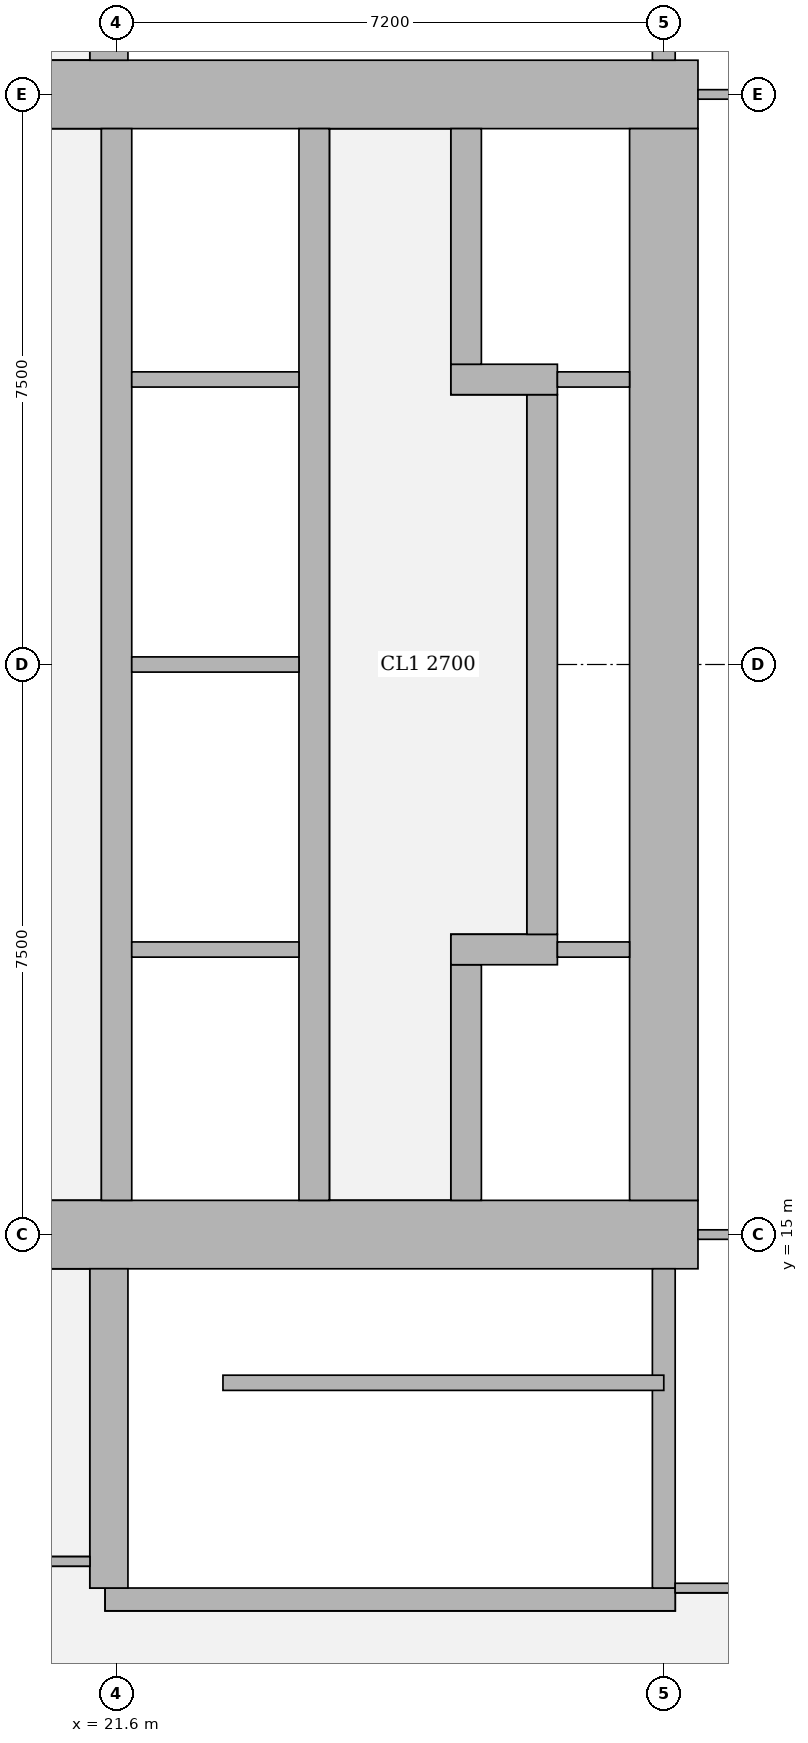
"""IFC4 building model, lengths in metres.
Left out: names, types, materials, properties, quantities, classifications, styles, units other than length and angle.
Written with IfcOpenShell. Run it as: python <this file> out.ifc"""

import sys

from ifc_helpers import new_model, si_unit, direction, frame, frame_2d, origin, place, context, subcontext, project, spatial, rectangle, extrude, element, fill, save


model = new_model("IFC4")
c1 = context("Model", 3, precision=1e-05, world=origin(), true_north=direction((0.0, 1.0)))
c2 = subcontext(c1, "Body", "Model", "MODEL_VIEW")
j1 = project(units=[si_unit("LENGTHUNIT", "METRE"), si_unit("PLANEANGLEUNIT", "RADIAN")], contexts=[c1])
p1 = place(None, origin())
s1 = spatial("IfcSite", under=j1, at=p1, CompositionType="ELEMENT")
p2 = place(p1, origin())
s2 = spatial("IfcBuilding", under=s1, at=p2, CompositionType="ELEMENT")
p3 = place(p2, frame((0.0, 0.0, 223.7)))
s3 = spatial("IfcBuildingStorey", under=s2, at=p3, CompositionType="ELEMENT", Elevation=223.7)
p4 = place(p3, frame((13.95, 15.0, 0.0), z_axis=(0.0, 0.0, 1.0), x_axis=(1.0, 0.0, 0.0)))
e1 = element("IfcWall", 1, at=p4, inside=s3, PredefinedType="SHEAR", context=c2, shape_type="SweptSolid", body=[
    extrude(rectangle(XDim=15.3, YDim=0.9, at=frame_2d((7.65, 0.0))), origin(), (0.0, 0.0, 1.0), 3.75),
])
p5 = place(p4, frame((4.45, 0.0, 0.0)))
e2 = element("IfcOpeningElement", 2, at=p5, cuts=e1, PredefinedType="OPENING", context=c2, shape_type="SweptSolid", body=[
    extrude(rectangle(XDim=1.8, YDim=2.1, at=frame_2d((0.9, 1.05))), frame((0.0, 0.46, 0.0), z_axis=(0.0, -1.0, 0.0), x_axis=(1.0, 0.0, 0.0)), (0.0, 0.0, 1.0), 0.92),
])
p6 = place(p4, frame((10.7, 0.0, 0.0)))
e3 = element("IfcOpeningElement", 3, at=p6, cuts=e1, PredefinedType="OPENING", context=c2, shape_type="SweptSolid", body=[
    extrude(rectangle(XDim=1.1, YDim=2.1, at=frame_2d((0.55, 1.05))), frame((0.0, 0.46, 0.0), z_axis=(0.0, -1.0, 0.0), x_axis=(1.0, 0.0, 0.0)), (0.0, 0.0, 1.0), 0.92),
])
p7 = place(p3, frame((13.95, 30.0, 0.0), z_axis=(0.0, 0.0, 1.0), x_axis=(1.0, 0.0, 0.0)))
e4 = element("IfcWall", 4, at=p7, inside=s3, PredefinedType="SHEAR", context=c2, shape_type="SweptSolid", body=[
    extrude(rectangle(XDim=15.3, YDim=0.9, at=frame_2d((7.65, 0.0))), origin(), (0.0, 0.0, 1.0), 3.75),
])
p8 = place(p7, frame((4.45, 0.0, 0.0)))
e5 = element("IfcOpeningElement", 5, at=p8, cuts=e4, PredefinedType="OPENING", context=c2, shape_type="SweptSolid", body=[
    extrude(rectangle(XDim=1.8, YDim=2.1, at=frame_2d((0.9, 1.05))), frame((0.0, 0.46, 0.0), z_axis=(0.0, -1.0, 0.0), x_axis=(1.0, 0.0, 0.0)), (0.0, 0.0, 1.0), 0.92),
])
p9 = place(p7, frame((10.7, 0.0, 0.0)))
e6 = element("IfcOpeningElement", 6, at=p9, cuts=e4, PredefinedType="OPENING", context=c2, shape_type="SweptSolid", body=[
    extrude(rectangle(XDim=1.1, YDim=2.1, at=frame_2d((0.55, 1.05))), frame((0.0, 0.46, 0.0), z_axis=(0.0, -1.0, 0.0), x_axis=(1.0, 0.0, 0.0)), (0.0, 0.0, 1.0), 0.92),
])
p10 = place(p3, frame((28.8, 15.45, 0.0), z_axis=(0.0, 0.0, 1.0), x_axis=(0.0, 1.0, 0.0)))
e7 = element("IfcWall", 7, at=p10, inside=s3, PredefinedType="SHEAR", context=c2, shape_type="SweptSolid", body=[
    extrude(rectangle(XDim=14.1, YDim=0.9, at=frame_2d((7.05, 0.0))), origin(), (0.0, 0.0, 1.0), 3.75),
])
p11 = place(p3, frame((21.6, 15.45, 0.0), z_axis=(0.0, 0.0, 1.0), x_axis=(0.0, 1.0, 0.0)))
e8 = element("IfcWall", 8, at=p11, inside=s3, PredefinedType="SHEAR", context=c2, shape_type="SweptSolid", body=[
    extrude(rectangle(XDim=14.1, YDim=0.4, at=frame_2d((7.05, 0.0))), origin(), (0.0, 0.0, 1.0), 3.75),
])
p12 = place(p11, frame((0.875, 0.0, 0.0)))
e9 = element("IfcOpeningElement", 9, at=p12, cuts=e8, PredefinedType="OPENING", context=c2, shape_type="SweptSolid", body=[
    extrude(rectangle(XDim=1.1, YDim=2.1, at=frame_2d((0.55, 1.05))), frame((0.0, 0.21, 0.0), z_axis=(0.0, -1.0, 0.0), x_axis=(1.0, 0.0, 0.0)), (0.0, 0.0, 1.0), 0.42),
])
p13 = place(p11, frame((4.625, 0.0, 0.0)))
e10 = element("IfcOpeningElement", 10, at=p13, cuts=e8, PredefinedType="OPENING", context=c2, shape_type="SweptSolid", body=[
    extrude(rectangle(XDim=1.1, YDim=2.1, at=frame_2d((0.55, 1.05))), frame((0.0, 0.21, 0.0), z_axis=(0.0, -1.0, 0.0), x_axis=(1.0, 0.0, 0.0)), (0.0, 0.0, 1.0), 0.42),
])
p14 = place(p11, frame((8.375, 0.0, 0.0)))
e11 = element("IfcOpeningElement", 11, at=p14, cuts=e8, PredefinedType="OPENING", context=c2, shape_type="SweptSolid", body=[
    extrude(rectangle(XDim=1.1, YDim=2.1, at=frame_2d((0.55, 1.05))), frame((0.0, 0.21, 0.0), z_axis=(0.0, -1.0, 0.0), x_axis=(1.0, 0.0, 0.0)), (0.0, 0.0, 1.0), 0.42),
])
p15 = place(p11, frame((12.125, 0.0, 0.0)))
e12 = element("IfcOpeningElement", 12, at=p15, cuts=e8, PredefinedType="OPENING", context=c2, shape_type="SweptSolid", body=[
    extrude(rectangle(XDim=1.1, YDim=2.1, at=frame_2d((0.55, 1.05))), frame((0.0, 0.21, 0.0), z_axis=(0.0, -1.0, 0.0), x_axis=(1.0, 0.0, 0.0)), (0.0, 0.0, 1.0), 0.42),
])
p16 = place(p3, frame((24.2, 15.45, 0.0), z_axis=(0.0, 0.0, 1.0), x_axis=(0.0, 1.0, 0.0)))
e13 = element("IfcWall", 13, at=p16, inside=s3, PredefinedType="SHEAR", context=c2, shape_type="SweptSolid", body=[
    extrude(rectangle(XDim=14.1, YDim=0.4, at=frame_2d((7.05, 0.0))), origin(), (0.0, 0.0, 1.0), 3.75),
])
p17 = place(p3, frame((26.2, 15.45, 0.0), z_axis=(0.0, 0.0, 1.0), x_axis=(0.0, 1.0, 0.0)))
e14 = element("IfcWall", 14, at=p17, inside=s3, PredefinedType="SHEAR", context=c2, shape_type="SweptSolid", body=[
    extrude(rectangle(XDim=3.1, YDim=0.4, at=frame_2d((1.55, 0.0))), origin(), (0.0, 0.0, 1.0), 3.75),
])
p18 = place(p17, frame((0.825, 0.0, 0.0)))
e15 = element("IfcOpeningElement", 15, at=p18, cuts=e14, PredefinedType="OPENING", context=c2, shape_type="SweptSolid", body=[
    extrude(rectangle(XDim=1.2, YDim=2.1, at=frame_2d((0.6, 1.05))), frame((0.0, 0.21, 0.0), z_axis=(0.0, -1.0, 0.0), x_axis=(1.0, 0.0, 0.0)), (0.0, 0.0, 1.0), 0.42),
])
p19 = place(p3, frame((26.0, 18.75, 0.0), z_axis=(0.0, 0.0, 1.0), x_axis=(1.0, 0.0, 0.0)))
e16 = element("IfcWall", 16, at=p19, inside=s3, PredefinedType="SHEAR", context=c2, shape_type="SweptSolid", body=[
    extrude(rectangle(XDim=1.4, YDim=0.4, at=frame_2d((0.7, 0.0))), origin(), (0.0, 0.0, 1.0), 3.75),
])
p20 = place(p3, frame((27.2, 18.95, 0.0), z_axis=(0.0, 0.0, 1.0), x_axis=(0.0, 1.0, 0.0)))
e17 = element("IfcWall", 17, at=p20, inside=s3, PredefinedType="SHEAR", context=c2, shape_type="SweptSolid", body=[
    extrude(rectangle(XDim=7.1, YDim=0.4, at=frame_2d((3.55, 0.0))), origin(), (0.0, 0.0, 1.0), 3.75),
])
p21 = place(p3, frame((26.0, 26.25, 0.0), z_axis=(0.0, 0.0, 1.0), x_axis=(1.0, 0.0, 0.0)))
e18 = element("IfcWall", 18, at=p21, inside=s3, PredefinedType="SHEAR", context=c2, shape_type="SweptSolid", body=[
    extrude(rectangle(XDim=1.4, YDim=0.4, at=frame_2d((0.7, 0.0))), origin(), (0.0, 0.0, 1.0), 3.75),
])
p22 = place(p3, frame((26.2, 26.45, 0.0), z_axis=(0.0, 0.0, 1.0), x_axis=(0.0, 1.0, 0.0)))
e19 = element("IfcWall", 19, at=p22, inside=s3, PredefinedType="SHEAR", context=c2, shape_type="SweptSolid", body=[
    extrude(rectangle(XDim=3.1, YDim=0.4, at=frame_2d((1.55, 0.0))), origin(), (0.0, 0.0, 1.0), 3.75),
])
p23 = place(p22, frame((1.075, 0.0, 0.0)))
e20 = element("IfcOpeningElement", 20, at=p23, cuts=e19, PredefinedType="OPENING", context=c2, shape_type="SweptSolid", body=[
    extrude(rectangle(XDim=1.2, YDim=2.1, at=frame_2d((0.6, 1.05))), frame((0.0, 0.21, 0.0), z_axis=(0.0, -1.0, 0.0), x_axis=(1.0, 0.0, 0.0)), (0.0, 0.0, 1.0), 0.42),
])
p24 = place(p3, frame((21.45, 10.2, 0.0), z_axis=(0.0, 0.0, 1.0), x_axis=(1.0, 0.0, 0.0)))
e21 = element("IfcWall", 21, at=p24, inside=s3, PredefinedType="SHEAR", context=c2, shape_type="SweptSolid", body=[
    extrude(rectangle(XDim=7.5, YDim=0.3, at=frame_2d((3.75, 0.0))), origin(), (0.0, 0.0, 1.0), 3.75),
])
p25 = place(p24, frame((0.5, 0.0, 0.0)))
e22 = element("IfcOpeningElement", 22, at=p25, cuts=e21, PredefinedType="OPENING", context=c2, shape_type="SweptSolid", body=[
    extrude(rectangle(XDim=1.1, YDim=2.1, at=frame_2d((0.55, 1.05))), frame((0.0, 0.16, 0.0), z_axis=(0.0, -1.0, 0.0), x_axis=(1.0, 0.0, 0.0)), (0.0, 0.0, 1.0), 0.32),
])
p26 = place(p3, frame((21.5, 10.35, 0.0), z_axis=(0.0, 0.0, 1.0), x_axis=(0.0, 1.0, 0.0)))
e23 = element("IfcWall", 23, at=p26, inside=s3, PredefinedType="SHEAR", context=c2, shape_type="SweptSolid", body=[
    extrude(rectangle(XDim=4.2, YDim=0.5, at=frame_2d((2.1, 0.0))), origin(), (0.0, 0.0, 1.0), 3.75),
])
p27 = place(p3, frame((28.8, 10.35, 0.0), z_axis=(0.0, 0.0, 1.0), x_axis=(0.0, 1.0, 0.0)))
e24 = element("IfcWall", 24, at=p27, inside=s3, PredefinedType="SHEAR", context=c2, shape_type="SweptSolid", body=[
    extrude(rectangle(XDim=4.2, YDim=0.3, at=frame_2d((2.1, 0.0))), origin(), (0.0, 0.0, 1.0), 3.75),
])
p28 = place(p3, frame((21.5, 30.45, 0.0), z_axis=(0.0, 0.0, 1.0), x_axis=(0.0, 1.0, 0.0)))
e25 = element("IfcWall", 25, at=p28, inside=s3, PredefinedType="SHEAR", context=c2, shape_type="SweptSolid", body=[
    extrude(rectangle(XDim=4.2, YDim=0.5, at=frame_2d((2.1, 0.0))), origin(), (0.0, 0.0, 1.0), 3.75),
])
p29 = place(p3, frame((28.8, 30.45, 0.0), z_axis=(0.0, 0.0, 1.0), x_axis=(0.0, 1.0, 0.0)))
e26 = element("IfcWall", 26, at=p29, inside=s3, PredefinedType="SHEAR", context=c2, shape_type="SweptSolid", body=[
    extrude(rectangle(XDim=4.2, YDim=0.3, at=frame_2d((2.1, 0.0))), origin(), (0.0, 0.0, 1.0), 3.75),
])
p30 = place(p3, frame((13.75, 10.7, 0.0), z_axis=(0.0, 0.0, 1.0), x_axis=(1.0, 0.0, 0.0)))
e27 = element("IfcWall", 27, at=p30, inside=s3, PredefinedType="PARTITIONING", context=c2, shape_type="SweptSolid", body=[
    extrude(rectangle(XDim=7.5, YDim=0.125, at=frame_2d((3.75, 0.0))), origin(), (0.0, 0.0, 1.0), 3.5),
])
p31 = place(p30, frame((4.245, 0.0, 0.0)))
e28 = element("IfcOpeningElement", 28, at=p31, cuts=e27, PredefinedType="OPENING", context=c2, shape_type="SweptSolid", body=[
    extrude(rectangle(XDim=1.8, YDim=2.1, at=frame_2d((0.9, 1.05))), frame((0.0, 0.073, 0.0), z_axis=(0.0, -1.0, 0.0), x_axis=(1.0, 0.0, 0.0)), (0.0, 0.0, 1.0), 0.145),
])
p32 = place(p3, frame((28.95, 10.35, 0.0), z_axis=(0.0, 0.0, 1.0), x_axis=(1.0, 0.0, 0.0)))
e29 = element("IfcWall", 29, at=p32, inside=s3, PredefinedType="PARTITIONING", context=c2, shape_type="SweptSolid", body=[
    extrude(rectangle(XDim=8.886, YDim=0.125, at=frame_2d((4.443, 0.0))), origin(), (0.0, 0.0, 1.0), 3.5),
])
p33 = place(p3, frame((29.25, 15.0, 0.0), z_axis=(0.0, 0.0, 1.0), x_axis=(1.0, 0.0, 0.0)))
e30 = element("IfcWall", 30, at=p33, inside=s3, PredefinedType="PARTITIONING", context=c2, shape_type="SweptSolid", body=[
    extrude(rectangle(XDim=6.049, YDim=0.125, at=frame_2d((3.024, 0.0))), origin(), (0.0, 0.0, 1.0), 3.5),
])
p34 = place(p3, frame((29.25, 30.0, 0.0), z_axis=(0.0, 0.0, 1.0), x_axis=(1.0, 0.0, 0.0)))
e31 = element("IfcWall", 31, at=p34, inside=s3, PredefinedType="PARTITIONING", context=c2, shape_type="SweptSolid", body=[
    extrude(rectangle(XDim=3.049, YDim=0.125, at=frame_2d((1.524, 0.0))), origin(), (0.0, 0.0, 1.0), 3.5),
])
p35 = place(p3, frame((23.0, 13.05, 0.0), z_axis=(0.0, 0.0, 1.0), x_axis=(1.0, 0.0, 0.0)))
e32 = element("IfcWall", 32, at=p35, inside=s3, PredefinedType="SHEAR", context=c2, shape_type="SweptSolid", body=[
    extrude(rectangle(XDim=5.8, YDim=0.2, at=frame_2d((2.9, 0.0))), origin(), (0.0, 0.0, 1.0), 3.75),
])
for number, where, z_axis, x_axis in (
    (33, (21.8, 18.75, 0.0), (0.0, 0.0, 1.0), (1.0, 0.0, 0.0)),
    (34, (21.8, 22.5, 0.0), (0.0, 0.0, 1.0), (1.0, 0.0, 0.0)),
    (35, (21.8, 26.25, 0.0), (0.0, 0.0, 1.0), (1.0, 0.0, 0.0)),
):
    element("IfcWall", number, at=place(p3, frame(where, z_axis=z_axis, x_axis=x_axis)), inside=s3, PredefinedType="SOLIDWALL", context=c2, shape_type="SweptSolid", body=[
        extrude(rectangle(XDim=2.2, YDim=0.2, at=frame_2d((1.1, 0.0))), origin(), (0.0, 0.0, 1.0), 3.5),
    ])
for number, where, z_axis, x_axis in (
    (36, (27.4, 18.75, 0.0), (0.0, 0.0, 1.0), (1.0, 0.0, 0.0)),
    (37, (27.4, 26.25, 0.0), (0.0, 0.0, 1.0), (1.0, 0.0, 0.0)),
):
    element("IfcWall", number, at=place(p3, frame(where, z_axis=z_axis, x_axis=x_axis)), inside=s3, PredefinedType="SOLIDWALL", context=c2, shape_type="SweptSolid", body=[
        extrude(rectangle(XDim=0.95, YDim=0.2, at=frame_2d((0.475, 0.0))), origin(), (0.0, 0.0, 1.0), 3.5),
    ])
p36 = place(p6, origin())
e38 = element("IfcDoor", 38, at=p36, inside=s3, OperationType="SINGLE_SWING_LEFT", PredefinedType="DOOR", context=c2, shape_type="SweptSolid", body=[
    extrude(rectangle(XDim=1.1, YDim=2.1, at=frame_2d((0.55, 1.05))), frame((0.0, 0.025, 0.0), z_axis=(0.0, -1.0, 0.0), x_axis=(1.0, 0.0, 0.0)), (0.0, 0.0, 1.0), 0.05),
])
fill(e3, e38)
p37 = place(p9, origin())
e39 = element("IfcDoor", 39, at=p37, inside=s3, OperationType="SINGLE_SWING_LEFT", PredefinedType="DOOR", context=c2, shape_type="SweptSolid", body=[
    extrude(rectangle(XDim=1.1, YDim=2.1, at=frame_2d((0.55, 1.05))), frame((0.0, 0.025, 0.0), z_axis=(0.0, -1.0, 0.0), x_axis=(1.0, 0.0, 0.0)), (0.0, 0.0, 1.0), 0.05),
])
fill(e6, e39)
p38 = place(p18, origin())
e40 = element("IfcDoor", 40, at=p38, inside=s3, OperationType="DOUBLE_DOOR_SLIDING", PredefinedType="DOOR", context=c2, shape_type="SweptSolid", body=[
    extrude(rectangle(XDim=1.2, YDim=2.1, at=frame_2d((0.6, 1.05))), frame((0.0, 0.025, 0.0), z_axis=(0.0, -1.0, 0.0), x_axis=(1.0, 0.0, 0.0)), (0.0, 0.0, 1.0), 0.05),
])
fill(e15, e40)
p39 = place(p23, origin())
e41 = element("IfcDoor", 41, at=p39, inside=s3, OperationType="DOUBLE_DOOR_SLIDING", PredefinedType="DOOR", context=c2, shape_type="SweptSolid", body=[
    extrude(rectangle(XDim=1.2, YDim=2.1, at=frame_2d((0.6, 1.05))), frame((0.0, 0.025, 0.0), z_axis=(0.0, -1.0, 0.0), x_axis=(1.0, 0.0, 0.0)), (0.0, 0.0, 1.0), 0.05),
])
fill(e20, e41)
p40 = place(p12, origin())
e42 = element("IfcDoor", 42, at=p40, inside=s3, OperationType="DOUBLE_DOOR_SLIDING", PredefinedType="DOOR", context=c2, shape_type="SweptSolid", body=[
    extrude(rectangle(XDim=1.1, YDim=2.1, at=frame_2d((0.55, 1.05))), frame((0.0, 0.025, 0.0), z_axis=(0.0, -1.0, 0.0), x_axis=(1.0, 0.0, 0.0)), (0.0, 0.0, 1.0), 0.05),
])
fill(e9, e42)
p41 = place(p13, origin())
e43 = element("IfcDoor", 43, at=p41, inside=s3, OperationType="DOUBLE_DOOR_SLIDING", PredefinedType="DOOR", context=c2, shape_type="SweptSolid", body=[
    extrude(rectangle(XDim=1.1, YDim=2.1, at=frame_2d((0.55, 1.05))), frame((0.0, 0.025, 0.0), z_axis=(0.0, -1.0, 0.0), x_axis=(1.0, 0.0, 0.0)), (0.0, 0.0, 1.0), 0.05),
])
fill(e10, e43)
p42 = place(p14, origin())
e44 = element("IfcDoor", 44, at=p42, inside=s3, OperationType="DOUBLE_DOOR_SLIDING", PredefinedType="DOOR", context=c2, shape_type="SweptSolid", body=[
    extrude(rectangle(XDim=1.1, YDim=2.1, at=frame_2d((0.55, 1.05))), frame((0.0, 0.025, 0.0), z_axis=(0.0, -1.0, 0.0), x_axis=(1.0, 0.0, 0.0)), (0.0, 0.0, 1.0), 0.05),
])
fill(e11, e44)
p43 = place(p15, origin())
e45 = element("IfcDoor", 45, at=p43, inside=s3, OperationType="DOUBLE_DOOR_SLIDING", PredefinedType="DOOR", context=c2, shape_type="SweptSolid", body=[
    extrude(rectangle(XDim=1.1, YDim=2.1, at=frame_2d((0.55, 1.05))), frame((0.0, 0.025, 0.0), z_axis=(0.0, -1.0, 0.0), x_axis=(1.0, 0.0, 0.0)), (0.0, 0.0, 1.0), 0.05),
])
fill(e12, e45)
p44 = place(p25, origin())
e46 = element("IfcDoor", 46, at=p44, inside=s3, OperationType="SINGLE_SWING_LEFT", PredefinedType="DOOR", context=c2, shape_type="SweptSolid", body=[
    extrude(rectangle(XDim=1.1, YDim=2.1, at=frame_2d((0.55, 1.05))), frame((0.0, 0.025, 0.0), z_axis=(0.0, -1.0, 0.0), x_axis=(1.0, 0.0, 0.0)), (0.0, 0.0, 1.0), 0.05),
])
fill(e22, e46)
save(model, sys.argv[1])
